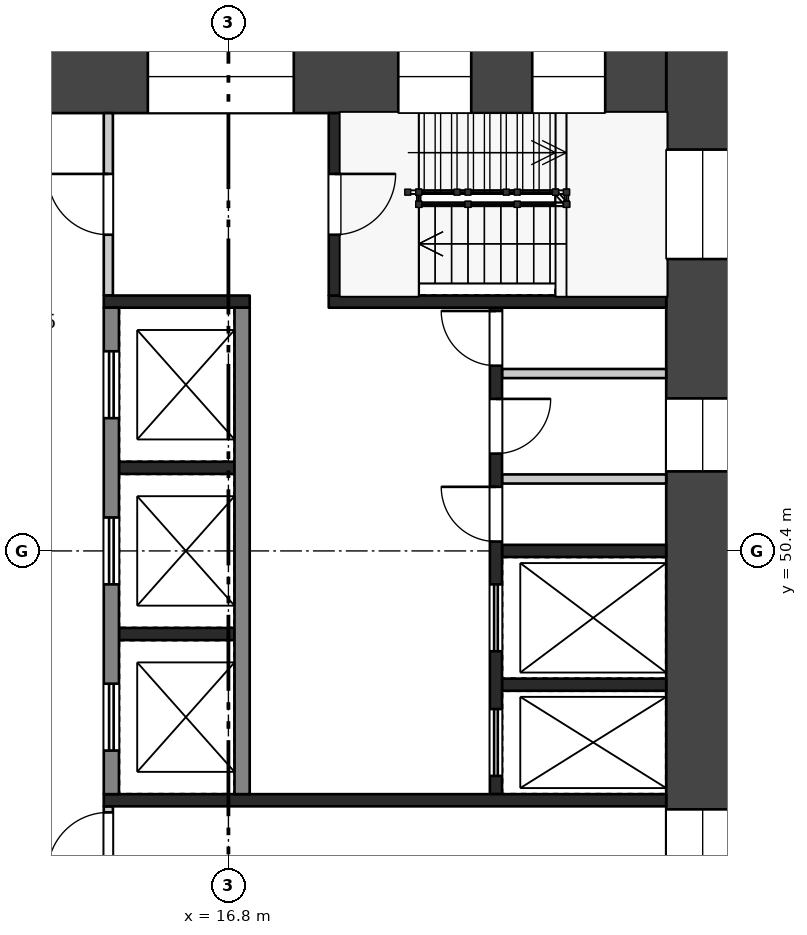
"""IFC4 building model, lengths in metres.
Left out: names, types, materials, properties, quantities, classifications, styles, units other than length and angle.
Written with IfcOpenShell. Run it as: python <this file> out.ifc"""

import sys

from ifc_helpers import new_model, si_unit, direction, frame, frame_2d, origin, place, context, subcontext, project, spatial, rectangle, extrude, element, fill, save


model = new_model("IFC4")
c1 = context("Model", 3, precision=1e-05, world=origin(), true_north=direction((0.0, 1.0)))
c2 = subcontext(c1, "Body", "Model", "MODEL_VIEW")
j1 = project(units=[si_unit("LENGTHUNIT", "METRE"), si_unit("PLANEANGLEUNIT", "RADIAN")], contexts=[c1])
p1 = place(None, origin())
s1 = spatial("IfcSite", under=j1, at=p1, CompositionType="ELEMENT")
p2 = place(p1, origin())
s2 = spatial("IfcBuilding", under=s1, at=p2, CompositionType="ELEMENT")
p3 = place(p2, frame((0.0, 0.0, 207.2)))
s3 = spatial("IfcBuildingStorey", under=s2, at=p3, CompositionType="ELEMENT", Elevation=207.2)
p4 = place(p3, frame((24.6, 58.8, 0.0), z_axis=(0.0, 0.0, 1.0), x_axis=(0.0, -1.0, 0.0)))
e1 = element("IfcWall", 1, at=p4, inside=s3, PredefinedType="SHEAR", context=c2, shape_type="SweptSolid", body=[
    extrude(rectangle(XDim=16.8, YDim=1.2, at=frame_2d((8.4, 0.0))), origin(), (0.0, 0.0, 1.0), 6.72),
])
p5 = place(p4, frame((1.8, 0.0, 0.5)))
e2 = element("IfcOpeningElement", 2, at=p5, cuts=e1, PredefinedType="OPENING", context=c2, shape_type="SweptSolid", body=[
    extrude(rectangle(XDim=1.8, YDim=2.4, at=frame_2d((0.9, 1.2))), frame((0.0, 0.61, 0.0), z_axis=(0.0, -1.0, 0.0), x_axis=(1.0, 0.0, 0.0)), (0.0, 0.0, 1.0), 1.22),
])
p6 = place(p4, frame((5.892, 0.0, 1.6)))
e3 = element("IfcOpeningElement", 3, at=p6, cuts=e1, PredefinedType="OPENING", context=c2, shape_type="SweptSolid", body=[
    extrude(rectangle(XDim=1.2, YDim=1.2, at=frame_2d((0.6, 0.6))), frame((0.0, 0.61, 0.0), z_axis=(0.0, -1.0, 0.0), x_axis=(1.0, 0.0, 0.0)), (0.0, 0.0, 1.0), 1.22),
])
p7 = place(p4, frame((12.65, 0.0, 0.6)))
e4 = element("IfcOpeningElement", 4, at=p7, cuts=e1, PredefinedType="OPENING", context=c2, shape_type="SweptSolid", body=[
    extrude(rectangle(XDim=1.0, YDim=2.1, at=frame_2d((0.5, 1.05))), frame((0.0, 0.61, 0.0), z_axis=(0.0, -1.0, 0.0), x_axis=(1.0, 0.0, 0.0)), (0.0, 0.0, 1.0), 1.22),
])
p8 = place(p4, frame((14.175, 0.0, 1.6)))
e5 = element("IfcOpeningElement", 5, at=p8, cuts=e1, PredefinedType="OPENING", context=c2, shape_type="SweptSolid", body=[
    extrude(rectangle(XDim=1.2, YDim=1.2, at=frame_2d((0.6, 0.6))), frame((0.0, 0.61, 0.0), z_axis=(0.0, -1.0, 0.0), x_axis=(1.0, 0.0, 0.0)), (0.0, 0.0, 1.0), 1.22),
])
p9 = place(p3, frame((9.6, 58.2, 0.0), z_axis=(0.0, 0.0, 1.0), x_axis=(1.0, 0.0, 0.0)))
e6 = element("IfcWall", 6, at=p9, inside=s3, PredefinedType="SHEAR", context=c2, shape_type="SweptSolid", body=[
    extrude(rectangle(XDim=14.4, YDim=1.2, at=frame_2d((7.2, 0.0))), origin(), (0.0, 0.0, 1.0), 6.72),
])
p10 = place(p9, frame((1.105, 0.0, 0.6)))
e7 = element("IfcOpeningElement", 7, at=p10, cuts=e6, PredefinedType="OPENING", context=c2, shape_type="SweptSolid", body=[
    extrude(rectangle(XDim=3.0, YDim=2.1, at=frame_2d((1.5, 1.05))), frame((0.0, 0.61, 0.0), z_axis=(0.0, -1.0, 0.0), x_axis=(1.0, 0.0, 0.0)), (0.0, 0.0, 1.0), 1.22),
])
p11 = place(p9, frame((5.875, 0.0, 0.6)))
e8 = element("IfcOpeningElement", 8, at=p11, cuts=e6, PredefinedType="OPENING", context=c2, shape_type="SweptSolid", body=[
    extrude(rectangle(XDim=2.4, YDim=2.1, at=frame_2d((1.2, 1.05))), frame((0.0, 0.61, 0.0), z_axis=(0.0, -1.0, 0.0), x_axis=(1.0, 0.0, 0.0)), (0.0, 0.0, 1.0), 1.22),
])
p12 = place(p9, frame((9.993, 0.0, 0.5)))
e9 = element("IfcOpeningElement", 9, at=p12, cuts=e6, PredefinedType="OPENING", context=c2, shape_type="SweptSolid", body=[
    extrude(rectangle(XDim=1.2, YDim=2.4, at=frame_2d((0.6, 1.2))), frame((0.0, 0.61, 0.0), z_axis=(0.0, -1.0, 0.0), x_axis=(1.0, 0.0, 0.0)), (0.0, 0.0, 1.0), 1.22),
])
p13 = place(p9, frame((12.197, 0.0, 0.5)))
e10 = element("IfcOpeningElement", 10, at=p13, cuts=e6, PredefinedType="OPENING", context=c2, shape_type="SweptSolid", body=[
    extrude(rectangle(XDim=1.2, YDim=2.4, at=frame_2d((0.6, 1.2))), frame((0.0, 0.61, 0.0), z_axis=(0.0, -1.0, 0.0), x_axis=(1.0, 0.0, 0.0)), (0.0, 0.0, 1.0), 1.22),
])
for number, where, z_axis, x_axis in (
    (11, (15.0, 51.767, 0.0), (0.0, 0.0, 1.0), (1.0, 0.0, 0.0)),
    (12, (15.0, 49.033, 0.0), (0.0, 0.0, 1.0), (1.0, 0.0, 0.0)),
):
    element("IfcWall", number, at=place(p3, frame(where, z_axis=z_axis, x_axis=x_axis)), inside=s3, PredefinedType="SHEAR", context=c2, shape_type="SweptSolid", body=[
        extrude(rectangle(XDim=1.9, YDim=0.2, at=frame_2d((0.95, 0.0))), origin(), (0.0, 0.0, 1.0), 6.72),
    ])
p14 = place(p3, frame((14.875, 54.4, 0.0), z_axis=(0.0, 0.0, 1.0), x_axis=(0.0, -1.0, 0.0)))
e13 = element("IfcWall", 13, at=p14, inside=s3, PredefinedType="SHEAR", context=c2, shape_type="SweptSolid", body=[
    extrude(rectangle(XDim=8.0, YDim=0.25, at=frame_2d((4.0, 0.0))), origin(), (0.0, 0.0, 1.0), 6.72),
])
p15 = place(p14, frame((0.717, 0.0, 0.0)))
e14 = element("IfcOpeningElement", 14, at=p15, cuts=e13, PredefinedType="OPENING", context=c2, shape_type="SweptSolid", body=[
    extrude(rectangle(XDim=1.1, YDim=2.1, at=frame_2d((0.55, 1.05))), frame((0.0, 0.135, 0.0), z_axis=(0.0, -1.0, 0.0), x_axis=(1.0, 0.0, 0.0)), (0.0, 0.0, 1.0), 0.27),
])
p16 = place(p14, frame((3.45, 0.0, 0.0)))
e15 = element("IfcOpeningElement", 15, at=p16, cuts=e13, PredefinedType="OPENING", context=c2, shape_type="SweptSolid", body=[
    extrude(rectangle(XDim=1.1, YDim=2.1, at=frame_2d((0.55, 1.05))), frame((0.0, 0.135, 0.0), z_axis=(0.0, -1.0, 0.0), x_axis=(1.0, 0.0, 0.0)), (0.0, 0.0, 1.0), 0.27),
])
p17 = place(p14, frame((6.183, 0.0, 0.0)))
e16 = element("IfcOpeningElement", 16, at=p17, cuts=e13, PredefinedType="OPENING", context=c2, shape_type="SweptSolid", body=[
    extrude(rectangle(XDim=1.1, YDim=2.1, at=frame_2d((0.55, 1.05))), frame((0.0, 0.135, 0.0), z_axis=(0.0, -1.0, 0.0), x_axis=(1.0, 0.0, 0.0)), (0.0, 0.0, 1.0), 0.27),
])
p18 = place(p3, frame((17.025, 54.4, 0.0), z_axis=(0.0, 0.0, 1.0), x_axis=(0.0, -1.0, 0.0)))
e17 = element("IfcWall", 17, at=p18, inside=s3, PredefinedType="SHEAR", context=c2, shape_type="SweptSolid", body=[
    extrude(rectangle(XDim=8.0, YDim=0.25, at=frame_2d((4.0, 0.0))), origin(), (0.0, 0.0, 1.0), 6.72),
])
for number, where, z_axis, x_axis in (
    (18, (21.3, 50.4, 0.0), (0.0, 0.0, 1.0), (1.0, 0.0, 0.0)),
    (19, (21.3, 48.2, 0.0), (0.0, 0.0, 1.0), (1.0, 0.0, 0.0)),
):
    element("IfcWall", number, at=place(p3, frame(where, z_axis=z_axis, x_axis=x_axis)), inside=s3, PredefinedType="SHEAR", context=c2, shape_type="SweptSolid", body=[
        extrude(rectangle(XDim=2.7, YDim=0.2, at=frame_2d((1.35, 0.0))), origin(), (0.0, 0.0, 1.0), 6.72),
    ])
for number, where, z_axis, x_axis in (
    (20, (21.3, 53.317, 0.0), (0.0, 0.0, 1.0), (1.0, 0.0, 0.0)),
    (21, (21.3, 51.583, 0.0), (0.0, 0.0, 1.0), (1.0, 0.0, 0.0)),
):
    element("IfcWall", number, at=place(p3, frame(where, z_axis=z_axis, x_axis=x_axis)), inside=s3, PredefinedType="PARTITIONING", context=c2, shape_type="SweptSolid", body=[
        extrude(rectangle(XDim=2.7, YDim=0.15, at=frame_2d((1.35, 0.0))), origin(), (0.0, 0.0, 1.0), 6.72),
    ])
p19 = place(p3, frame((21.2, 54.4, 0.0), z_axis=(0.0, 0.0, 1.0), x_axis=(0.0, -1.0, 0.0)))
e22 = element("IfcWall", 22, at=p19, inside=s3, PredefinedType="SHEAR", context=c2, shape_type="SweptSolid", body=[
    extrude(rectangle(XDim=8.0, YDim=0.2, at=frame_2d((4.0, 0.0))), origin(), (0.0, 0.0, 1.0), 6.72),
])
p20 = place(p19, frame((0.054, 0.0, 0.0)))
e23 = element("IfcOpeningElement", 23, at=p20, cuts=e22, PredefinedType="OPENING", context=c2, shape_type="SweptSolid", body=[
    extrude(rectangle(XDim=0.9, YDim=2.1, at=frame_2d((0.45, 1.05))), frame((0.0, 0.11, 0.0), z_axis=(0.0, -1.0, 0.0), x_axis=(1.0, 0.0, 0.0)), (0.0, 0.0, 1.0), 0.22),
])
p21 = place(p19, frame((1.5, 0.0, 0.0)))
e24 = element("IfcOpeningElement", 24, at=p21, cuts=e22, PredefinedType="OPENING", context=c2, shape_type="SweptSolid", body=[
    extrude(rectangle(XDim=0.9, YDim=2.1, at=frame_2d((0.45, 1.05))), frame((0.0, 0.11, 0.0), z_axis=(0.0, -1.0, 0.0), x_axis=(1.0, 0.0, 0.0)), (0.0, 0.0, 1.0), 0.22),
])
p22 = place(p19, frame((2.946, 0.0, 0.0)))
e25 = element("IfcOpeningElement", 25, at=p22, cuts=e22, PredefinedType="OPENING", context=c2, shape_type="SweptSolid", body=[
    extrude(rectangle(XDim=0.9, YDim=2.1, at=frame_2d((0.45, 1.05))), frame((0.0, 0.11, 0.0), z_axis=(0.0, -1.0, 0.0), x_axis=(1.0, 0.0, 0.0)), (0.0, 0.0, 1.0), 0.22),
])
p23 = place(p19, frame((4.55, 0.0, 0.0)))
e26 = element("IfcOpeningElement", 26, at=p23, cuts=e22, PredefinedType="OPENING", context=c2, shape_type="SweptSolid", body=[
    extrude(rectangle(XDim=1.1, YDim=2.1, at=frame_2d((0.55, 1.05))), frame((0.0, 0.11, 0.0), z_axis=(0.0, -1.0, 0.0), x_axis=(1.0, 0.0, 0.0)), (0.0, 0.0, 1.0), 0.22),
])
p24 = place(p19, frame((6.6, 0.0, 0.0)))
e27 = element("IfcOpeningElement", 27, at=p24, cuts=e22, PredefinedType="OPENING", context=c2, shape_type="SweptSolid", body=[
    extrude(rectangle(XDim=1.1, YDim=2.1, at=frame_2d((0.55, 1.05))), frame((0.0, 0.11, 0.0), z_axis=(0.0, -1.0, 0.0), x_axis=(1.0, 0.0, 0.0)), (0.0, 0.0, 1.0), 0.22),
])
p25 = place(p3, frame((14.75, 54.5, 0.0), z_axis=(0.0, 0.0, 1.0), x_axis=(1.0, 0.0, 0.0)))
e28 = element("IfcWall", 28, at=p25, inside=s3, PredefinedType="SHEAR", context=c2, shape_type="SweptSolid", body=[
    extrude(rectangle(XDim=2.4, YDim=0.2, at=frame_2d((1.2, 0.0))), origin(), (0.0, 0.0, 1.0), 6.72),
])
p26 = place(p3, frame((18.45, 54.5, 0.0), z_axis=(0.0, 0.0, 1.0), x_axis=(1.0, 0.0, 0.0)))
e29 = element("IfcWall", 29, at=p26, inside=s3, PredefinedType="SHEAR", context=c2, shape_type="SweptSolid", body=[
    extrude(rectangle(XDim=5.55, YDim=0.2, at=frame_2d((2.775, 0.0))), origin(), (0.0, 0.0, 1.0), 6.72),
])
p27 = place(p3, frame((14.825, 57.6, 0.0), z_axis=(0.0, 0.0, 1.0), x_axis=(0.0, -1.0, 0.0)))
e30 = element("IfcWall", 30, at=p27, inside=s3, PredefinedType="PARTITIONING", context=c2, shape_type="SweptSolid", body=[
    extrude(rectangle(XDim=3.0, YDim=0.15, at=frame_2d((1.5, 0.0))), origin(), (0.0, 0.0, 1.0), 6.72),
])
p28 = place(p27, frame((1.0, 0.0, 0.0)))
e31 = element("IfcOpeningElement", 31, at=p28, cuts=e30, PredefinedType="OPENING", context=c2, shape_type="SweptSolid", body=[
    extrude(rectangle(XDim=1.0, YDim=2.1, at=frame_2d((0.5, 1.05))), frame((0.0, 0.085, 0.0), z_axis=(0.0, -1.0, 0.0), x_axis=(1.0, 0.0, 0.0)), (0.0, 0.0, 1.0), 0.17),
])
p29 = place(p3, frame((18.55, 57.6, 0.0), z_axis=(0.0, 0.0, 1.0), x_axis=(0.0, -1.0, 0.0)))
e32 = element("IfcWall", 32, at=p29, inside=s3, PredefinedType="SHEAR", context=c2, shape_type="SweptSolid", body=[
    extrude(rectangle(XDim=3.0, YDim=0.2, at=frame_2d((1.5, 0.0))), origin(), (0.0, 0.0, 1.0), 6.72),
])
p30 = place(p29, frame((1.0, 0.0, 0.0)))
e33 = element("IfcOpeningElement", 33, at=p30, cuts=e32, PredefinedType="OPENING", context=c2, shape_type="SweptSolid", body=[
    extrude(rectangle(XDim=1.0, YDim=2.1, at=frame_2d((0.5, 1.05))), frame((0.0, 0.11, 0.0), z_axis=(0.0, -1.0, 0.0), x_axis=(1.0, 0.0, 0.0)), (0.0, 0.0, 1.0), 0.22),
])
p31 = place(p3, frame((14.75, 46.3, 0.0), z_axis=(0.0, 0.0, 1.0), x_axis=(1.0, 0.0, 0.0)))
e34 = element("IfcWall", 34, at=p31, inside=s3, PredefinedType="SHEAR", context=c2, shape_type="SweptSolid", body=[
    extrude(rectangle(XDim=9.25, YDim=0.2, at=frame_2d((4.625, 0.0))), origin(), (0.0, 0.0, 1.0), 6.72),
])
p32 = place(p3, frame((14.825, 46.2, 0.0), z_axis=(0.0, 0.0, 1.0), x_axis=(0.0, -1.0, 0.0)))
e35 = element("IfcWall", 35, at=p32, inside=s3, PredefinedType="PARTITIONING", context=c2, shape_type="SweptSolid", body=[
    extrude(rectangle(XDim=3.0, YDim=0.15, at=frame_2d((1.5, 0.0))), origin(), (0.0, 0.0, 1.0), 6.72),
])
p33 = place(p32, frame((0.1, 0.0, 0.0)))
e36 = element("IfcOpeningElement", 36, at=p33, cuts=e35, PredefinedType="OPENING", context=c2, shape_type="SweptSolid", body=[
    extrude(rectangle(XDim=1.0, YDim=2.1, at=frame_2d((0.5, 1.05))), frame((0.0, 0.085, 0.0), z_axis=(0.0, -1.0, 0.0), x_axis=(1.0, 0.0, 0.0)), (0.0, 0.0, 1.0), 0.17),
])
p34 = place(p15, origin())
e37 = element("IfcDoor", 37, at=p34, inside=s3, OperationType="DOUBLE_DOOR_SLIDING", PredefinedType="DOOR", context=c2, shape_type="SweptSolid", body=[
    extrude(rectangle(XDim=1.1, YDim=2.1, at=frame_2d((0.55, 1.05))), frame((0.0, 0.025, 0.0), z_axis=(0.0, -1.0, 0.0), x_axis=(1.0, 0.0, 0.0)), (0.0, 0.0, 1.0), 0.05),
])
fill(e14, e37)
p35 = place(p16, origin())
e38 = element("IfcDoor", 38, at=p35, inside=s3, OperationType="DOUBLE_DOOR_SLIDING", PredefinedType="DOOR", context=c2, shape_type="SweptSolid", body=[
    extrude(rectangle(XDim=1.1, YDim=2.1, at=frame_2d((0.55, 1.05))), frame((0.0, 0.025, 0.0), z_axis=(0.0, -1.0, 0.0), x_axis=(1.0, 0.0, 0.0)), (0.0, 0.0, 1.0), 0.05),
])
fill(e15, e38)
p36 = place(p17, origin())
e39 = element("IfcDoor", 39, at=p36, inside=s3, OperationType="DOUBLE_DOOR_SLIDING", PredefinedType="DOOR", context=c2, shape_type="SweptSolid", body=[
    extrude(rectangle(XDim=1.1, YDim=2.1, at=frame_2d((0.55, 1.05))), frame((0.0, 0.025, 0.0), z_axis=(0.0, -1.0, 0.0), x_axis=(1.0, 0.0, 0.0)), (0.0, 0.0, 1.0), 0.05),
])
fill(e16, e39)
p37 = place(p20, frame((0.9, 0.0, 0.0), z_axis=(0.0, 0.0, 1.0), x_axis=(-1.0, 0.0, 0.0)))
e40 = element("IfcDoor", 40, at=p37, inside=s3, OperationType="SINGLE_SWING_RIGHT", PredefinedType="DOOR", context=c2, shape_type="SweptSolid", body=[
    extrude(rectangle(XDim=0.9, YDim=2.1, at=frame_2d((0.45, 1.05))), frame((0.0, 0.025, 0.0), z_axis=(0.0, -1.0, 0.0), x_axis=(1.0, 0.0, 0.0)), (0.0, 0.0, 1.0), 0.05),
])
fill(e23, e40)
p38 = place(p21, origin())
e41 = element("IfcDoor", 41, at=p38, inside=s3, OperationType="SINGLE_SWING_LEFT", PredefinedType="DOOR", context=c2, shape_type="SweptSolid", body=[
    extrude(rectangle(XDim=0.9, YDim=2.1, at=frame_2d((0.45, 1.05))), frame((0.0, 0.025, 0.0), z_axis=(0.0, -1.0, 0.0), x_axis=(1.0, 0.0, 0.0)), (0.0, 0.0, 1.0), 0.05),
])
fill(e24, e41)
p39 = place(p22, frame((0.9, 0.0, 0.0), z_axis=(0.0, 0.0, 1.0), x_axis=(-1.0, 0.0, 0.0)))
e42 = element("IfcDoor", 42, at=p39, inside=s3, OperationType="SINGLE_SWING_RIGHT", PredefinedType="DOOR", context=c2, shape_type="SweptSolid", body=[
    extrude(rectangle(XDim=0.9, YDim=2.1, at=frame_2d((0.45, 1.05))), frame((0.0, 0.025, 0.0), z_axis=(0.0, -1.0, 0.0), x_axis=(1.0, 0.0, 0.0)), (0.0, 0.0, 1.0), 0.05),
])
fill(e25, e42)
p40 = place(p23, origin())
e43 = element("IfcDoor", 43, at=p40, inside=s3, OperationType="DOUBLE_DOOR_SLIDING", PredefinedType="DOOR", context=c2, shape_type="SweptSolid", body=[
    extrude(rectangle(XDim=1.1, YDim=2.1, at=frame_2d((0.55, 1.05))), frame((0.0, 0.025, 0.0), z_axis=(0.0, -1.0, 0.0), x_axis=(1.0, 0.0, 0.0)), (0.0, 0.0, 1.0), 0.05),
])
fill(e26, e43)
p41 = place(p24, origin())
e44 = element("IfcDoor", 44, at=p41, inside=s3, OperationType="DOUBLE_DOOR_SLIDING", PredefinedType="DOOR", context=c2, shape_type="SweptSolid", body=[
    extrude(rectangle(XDim=1.1, YDim=2.1, at=frame_2d((0.55, 1.05))), frame((0.0, 0.025, 0.0), z_axis=(0.0, -1.0, 0.0), x_axis=(1.0, 0.0, 0.0)), (0.0, 0.0, 1.0), 0.05),
])
fill(e27, e44)
p42 = place(p28, frame((1.0, 0.0, 0.0), z_axis=(0.0, 0.0, 1.0), x_axis=(-1.0, 0.0, 0.0)))
e45 = element("IfcDoor", 45, at=p42, inside=s3, OperationType="SINGLE_SWING_RIGHT", PredefinedType="DOOR", context=c2, shape_type="SweptSolid", body=[
    extrude(rectangle(XDim=1.0, YDim=2.1, at=frame_2d((0.5, 1.05))), frame((0.0, 0.025, 0.0), z_axis=(0.0, -1.0, 0.0), x_axis=(1.0, 0.0, 0.0)), (0.0, 0.0, 1.0), 0.05),
])
fill(e31, e45)
p43 = place(p30, origin())
e46 = element("IfcDoor", 46, at=p43, inside=s3, OperationType="SINGLE_SWING_LEFT", PredefinedType="DOOR", context=c2, shape_type="SweptSolid", body=[
    extrude(rectangle(XDim=1.0, YDim=2.1, at=frame_2d((0.5, 1.05))), frame((0.0, 0.025, 0.0), z_axis=(0.0, -1.0, 0.0), x_axis=(1.0, 0.0, 0.0)), (0.0, 0.0, 1.0), 0.05),
])
fill(e33, e46)
p44 = place(p33, frame((1.0, 0.0, 0.0), z_axis=(0.0, 0.0, 1.0), x_axis=(-1.0, 0.0, 0.0)))
e47 = element("IfcDoor", 47, at=p44, inside=s3, OperationType="SINGLE_SWING_LEFT", PredefinedType="DOOR", context=c2, shape_type="SweptSolid", body=[
    extrude(rectangle(XDim=1.0, YDim=2.1, at=frame_2d((0.5, 1.05))), frame((0.0, 0.025, 0.0), z_axis=(0.0, -1.0, 0.0), x_axis=(1.0, 0.0, 0.0)), (0.0, 0.0, 1.0), 0.05),
])
fill(e36, e47)
p45 = place(p5, origin())
e48 = element("IfcWindow", 48, at=p45, inside=s3, PartitioningType="SINGLE_PANEL", PredefinedType="WINDOW", context=c2, shape_type="SweptSolid", body=[
    extrude(rectangle(XDim=1.8, YDim=2.4, at=frame_2d((0.9, 1.2))), frame((0.0, 0.03, 0.0), z_axis=(0.0, -1.0, 0.0), x_axis=(1.0, 0.0, 0.0)), (0.0, 0.0, 1.0), 0.06),
])
fill(e2, e48)
p46 = place(p6, origin())
e49 = element("IfcWindow", 49, at=p46, inside=s3, PartitioningType="SINGLE_PANEL", PredefinedType="WINDOW", context=c2, shape_type="SweptSolid", body=[
    extrude(rectangle(XDim=1.2, YDim=1.2, at=frame_2d((0.6, 0.6))), frame((0.0, 0.03, 0.0), z_axis=(0.0, -1.0, 0.0), x_axis=(1.0, 0.0, 0.0)), (0.0, 0.0, 1.0), 0.06),
])
fill(e3, e49)
p47 = place(p7, origin())
e50 = element("IfcWindow", 50, at=p47, inside=s3, PartitioningType="SINGLE_PANEL", PredefinedType="WINDOW", context=c2, shape_type="SweptSolid", body=[
    extrude(rectangle(XDim=1.0, YDim=2.1, at=frame_2d((0.5, 1.05))), frame((0.0, 0.03, 0.0), z_axis=(0.0, -1.0, 0.0), x_axis=(1.0, 0.0, 0.0)), (0.0, 0.0, 1.0), 0.06),
])
fill(e4, e50)
p48 = place(p11, origin())
e51 = element("IfcWindow", 51, at=p48, inside=s3, PartitioningType="SINGLE_PANEL", PredefinedType="WINDOW", context=c2, shape_type="SweptSolid", body=[
    extrude(rectangle(XDim=2.4, YDim=2.1, at=frame_2d((1.2, 1.05))), frame((0.0, 0.03, 0.0), z_axis=(0.0, -1.0, 0.0), x_axis=(1.0, 0.0, 0.0)), (0.0, 0.0, 1.0), 0.06),
])
fill(e8, e51)
p49 = place(p12, origin())
e52 = element("IfcWindow", 52, at=p49, inside=s3, PartitioningType="SINGLE_PANEL", PredefinedType="WINDOW", context=c2, shape_type="SweptSolid", body=[
    extrude(rectangle(XDim=1.2, YDim=2.4, at=frame_2d((0.6, 1.2))), frame((0.0, 0.03, 0.0), z_axis=(0.0, -1.0, 0.0), x_axis=(1.0, 0.0, 0.0)), (0.0, 0.0, 1.0), 0.06),
])
fill(e9, e52)
p50 = place(p13, origin())
e53 = element("IfcWindow", 53, at=p50, inside=s3, PartitioningType="SINGLE_PANEL", PredefinedType="WINDOW", context=c2, shape_type="SweptSolid", body=[
    extrude(rectangle(XDim=1.2, YDim=2.4, at=frame_2d((0.6, 1.2))), frame((0.0, 0.03, 0.0), z_axis=(0.0, -1.0, 0.0), x_axis=(1.0, 0.0, 0.0)), (0.0, 0.0, 1.0), 0.06),
])
fill(e10, e53)
save(model, sys.argv[1])
